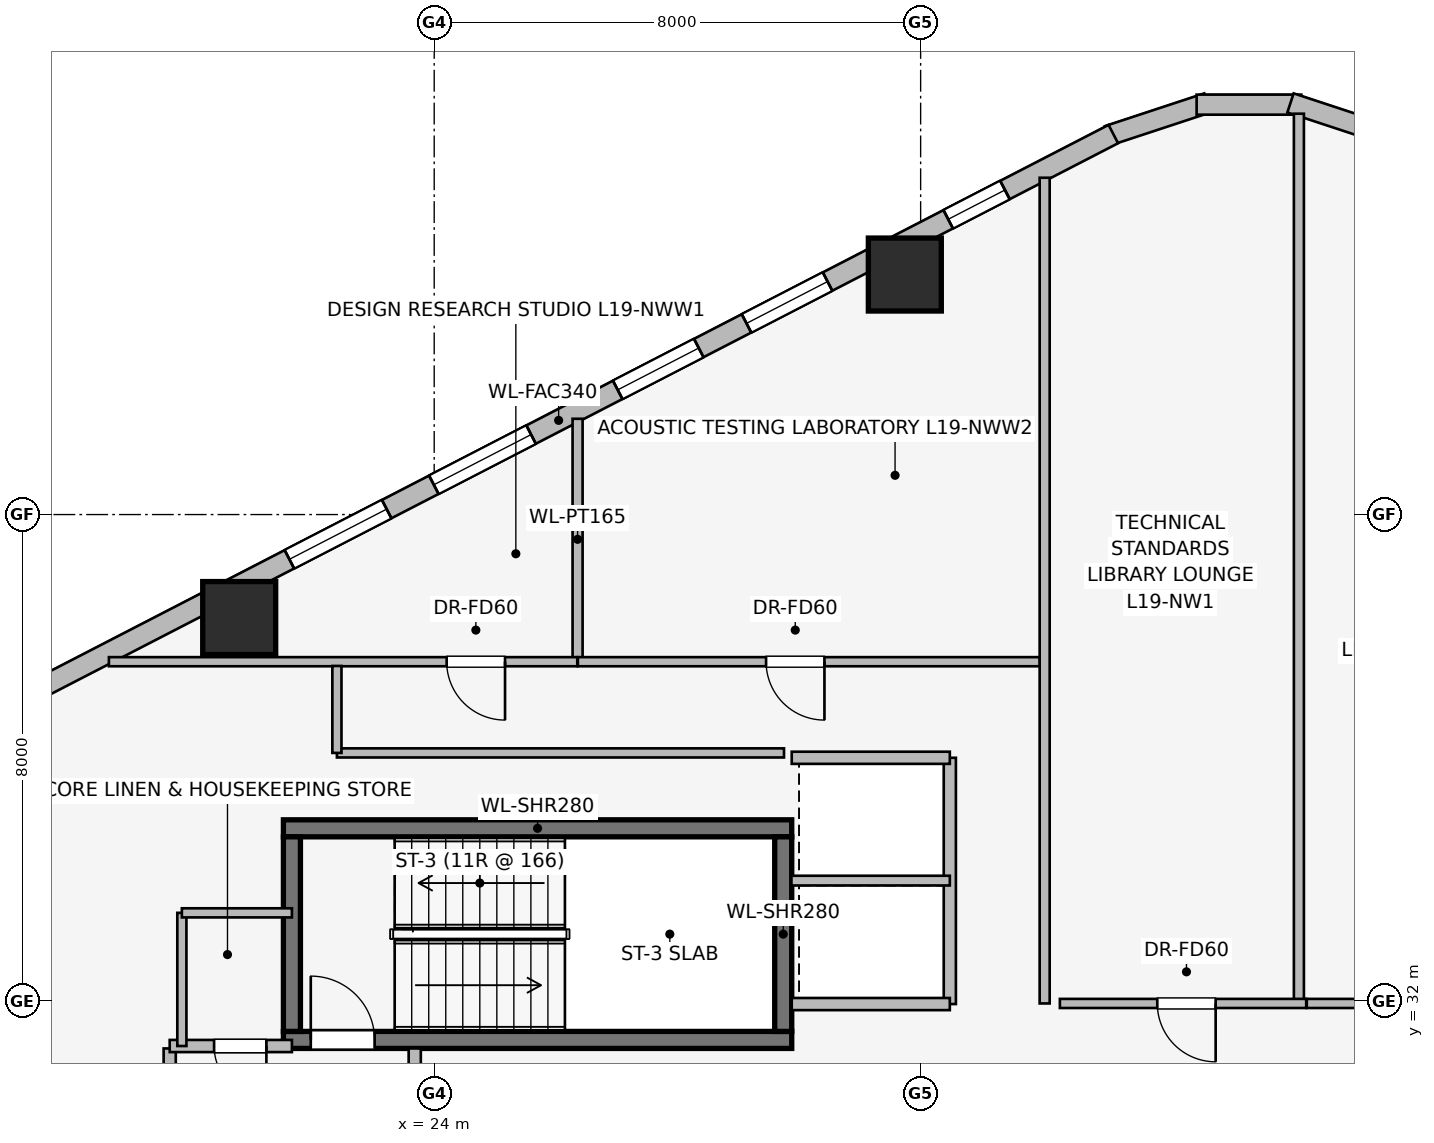
"""IFC4 building model, lengths in metres.
Left out: names, types, materials, properties, quantities, classifications, styles, units other than length and angle.
Written with IfcOpenShell. Run it as: python <this file> out.ifc"""

import sys

from ifc_helpers import new_model, si_unit, direction, frame, frame_2d, origin, origin_2d, place, context, subcontext, project, spatial, rectangle, extrude, element, fill, save


model = new_model("IFC4")
c1 = context("Model", 3, precision=1e-05, world=origin(), true_north=direction((0.0, 1.0)))
c2 = subcontext(c1, "Body", "Model", "MODEL_VIEW")
j1 = project(units=[si_unit("LENGTHUNIT", "METRE"), si_unit("PLANEANGLEUNIT", "RADIAN")], contexts=[c1])
p1 = place(None, origin())
s1 = spatial("IfcSite", under=j1, at=p1, CompositionType="ELEMENT")
p2 = place(p1, origin())
s2 = spatial("IfcBuilding", under=s1, at=p2, CompositionType="ELEMENT")
p3 = place(p2, frame((0.0, 0.0, 74.45)))
s3 = spatial("IfcBuildingStorey", under=s2, at=p3, CompositionType="ELEMENT", Elevation=74.45)
p4 = place(p3, frame((21.52, 31.36, 0.0), z_axis=(0.0, 0.0, 1.0), x_axis=(1.0, 0.0, 0.0)))
e1 = element("IfcWall", 1, at=p4, inside=s3, PredefinedType="SHEAR", context=c2, shape_type="SweptSolid", body=[
    extrude(rectangle(XDim=8.36, YDim=0.28, at=frame_2d((4.18, 0.0))), origin(), (0.0, 0.0, 1.0), 3.65),
])
p5 = place(p4, frame((0.45, 0.0, 0.0)))
e2 = element("IfcOpeningElement", 2, at=p5, cuts=e1, PredefinedType="OPENING", context=c2, shape_type="SweptSolid", body=[
    extrude(rectangle(XDim=1.05, YDim=2.0, at=frame_2d((0.525, 1.0))), frame((0.0, 0.15, 0.0), z_axis=(0.0, -1.0, 0.0), x_axis=(1.0, 0.0, 0.0)), (0.0, 0.0, 1.0), 0.3),
])
p6 = place(p3, frame((29.88, 34.84, 0.0), z_axis=(0.0, 0.0, 1.0), x_axis=(-1.0, 0.0, 0.0)))
e3 = element("IfcWall", 3, at=p6, inside=s3, PredefinedType="SHEAR", context=c2, shape_type="SweptSolid", body=[
    extrude(rectangle(XDim=8.36, YDim=0.28, at=frame_2d((4.18, 0.0))), origin(), (0.0, 0.0, 1.0), 3.65),
])
for number, where, z_axis, x_axis in (
    (4, (21.66, 34.7, 0.0), (0.0, 0.0, 1.0), (0.0, -1.0, 0.0)),
    (5, (29.74, 31.5, 0.0), (0.0, 0.0, 1.0), (0.0, 1.0, 0.0)),
):
    element("IfcWall", number, at=place(p3, frame(where, z_axis=z_axis, x_axis=x_axis)), inside=s3, PredefinedType="SHEAR", context=c2, shape_type="SweptSolid", body=[
        extrude(rectangle(XDim=3.2, YDim=0.28, at=frame_2d((1.6, 0.0))), origin(), (0.0, 0.0, 1.0), 3.65),
    ])
for number, where, z_axis, x_axis in (
    (6, (31.74, 43.947, 0.0), (0.0, 0.0, 1.0), (1.0, 0.0, 0.0)),
    (7, (20.793, 38.298, 0.0), (0.0, 0.0, 1.0), (1.0, 0.0, 0.0)),
):
    element("IfcColumn", number, at=place(p3, frame(where, z_axis=z_axis, x_axis=x_axis)), inside=s3, PredefinedType="COLUMN", context=c2, shape_type="SweptSolid", body=[
        extrude(rectangle(XDim=1.2, YDim=1.2, at=origin_2d()), origin(), (0.0, 0.0, 1.0), 3.65),
    ])
p7 = place(p3, frame((35.081, 46.231, 0.0), z_axis=(0.0, 0.0, 1.0), x_axis=(0.94976901097, 0.312951794691, 0.0)))
e8 = element("IfcWall", 8, at=p7, inside=s3, PredefinedType="STANDARD", context=c2, shape_type="SweptSolid", body=[
    extrude(rectangle(XDim=1.722, YDim=0.33, at=frame_2d((0.861, 0.0))), origin(), (0.0, 0.0, 1.0), 3.39),
])
p8 = place(p3, frame((36.539, 46.741, 0.0), z_axis=(0.0, 0.0, 1.0), x_axis=(1.0, 0.0, 0.0)))
e9 = element("IfcWall", 9, at=p8, inside=s3, PredefinedType="STANDARD", context=c2, shape_type="SweptSolid", body=[
    extrude(rectangle(XDim=1.722, YDim=0.33, at=frame_2d((0.861, 0.0))), origin(), (0.0, 0.0, 1.0), 3.39),
])
p9 = place(p3, frame((38.083, 46.77, 0.0), z_axis=(0.0, 0.0, 1.0), x_axis=(0.94976901097, -0.312951794691, 0.0)))
e10 = element("IfcWall", 10, at=p9, inside=s3, PredefinedType="STANDARD", context=c2, shape_type="SweptSolid", body=[
    extrude(rectangle(XDim=1.722, YDim=0.33, at=frame_2d((0.861, 0.0))), origin(), (0.0, 0.0, 1.0), 3.39),
])
p10 = place(p3, frame((16.924, 36.841, 0.0), z_axis=(0.0, 0.0, 1.0), x_axis=(0.888634413993, 0.458616264721, 0.0)))
e11 = element("IfcWall", 11, at=p10, inside=s3, PredefinedType="STANDARD", context=c2, shape_type="SweptSolid", body=[
    extrude(rectangle(XDim=20.531, YDim=0.34, at=frame_2d((10.266, 0.0))), origin(), (0.0, 0.0, 1.0), 2.684),
])
p11 = place(p10, frame((5.283, 0.0, 0.75)))
e12 = element("IfcOpeningElement", 12, at=p11, cuts=e11, PredefinedType="OPENING", context=c2, shape_type="SweptSolid", body=[
    extrude(rectangle(XDim=1.8, YDim=1.5, at=frame_2d((0.9, 0.75))), frame((0.0, 0.18, 0.0), z_axis=(0.0, -1.0, 0.0), x_axis=(1.0, 0.0, 0.0)), (0.0, 0.0, 1.0), 0.36),
])
p12 = place(p10, frame((7.956, 0.0, 0.75)))
e13 = element("IfcOpeningElement", 13, at=p12, cuts=e11, PredefinedType="OPENING", context=c2, shape_type="SweptSolid", body=[
    extrude(rectangle(XDim=1.8, YDim=1.5, at=frame_2d((0.9, 0.75))), frame((0.0, 0.18, 0.0), z_axis=(0.0, -1.0, 0.0), x_axis=(1.0, 0.0, 0.0)), (0.0, 0.0, 1.0), 0.36),
])
p13 = place(p10, frame((11.359, 0.0, 0.75)))
e14 = element("IfcOpeningElement", 14, at=p13, cuts=e11, PredefinedType="OPENING", context=c2, shape_type="SweptSolid", body=[
    extrude(rectangle(XDim=1.5, YDim=1.5, at=frame_2d((0.75, 0.75))), frame((0.0, 0.18, 0.0), z_axis=(0.0, -1.0, 0.0), x_axis=(1.0, 0.0, 0.0)), (0.0, 0.0, 1.0), 0.36),
])
p14 = place(p10, frame((13.743, 0.0, 0.75)))
e15 = element("IfcOpeningElement", 15, at=p14, cuts=e11, PredefinedType="OPENING", context=c2, shape_type="SweptSolid", body=[
    extrude(rectangle(XDim=1.5, YDim=1.5, at=frame_2d((0.75, 0.75))), frame((0.0, 0.18, 0.0), z_axis=(0.0, -1.0, 0.0), x_axis=(1.0, 0.0, 0.0)), (0.0, 0.0, 1.0), 0.36),
])
p15 = place(p10, frame((17.476, 0.0, 0.75)))
e16 = element("IfcOpeningElement", 16, at=p15, cuts=e11, PredefinedType="OPENING", context=c2, shape_type="SweptSolid", body=[
    extrude(rectangle(XDim=1.05, YDim=1.4, at=frame_2d((0.525, 0.7))), frame((0.0, 0.18, 0.0), z_axis=(0.0, -1.0, 0.0), x_axis=(1.0, 0.0, 0.0)), (0.0, 0.0, 1.0), 0.36),
])
p16 = place(p3, frame((19.65, 25.68, 0.0), z_axis=(0.0, 0.0, 1.0), x_axis=(0.0, 1.0, 0.0)))
e17 = element("IfcWall", 17, at=p16, inside=s3, PredefinedType="PARTITIONING", context=c2, shape_type="SweptSolid", body=[
    extrude(rectangle(XDim=5.54, YDim=0.2, at=frame_2d((2.77, 0.0))), origin(), (0.0, 0.0, 1.0), 3.39),
])
p17 = place(p16, frame((0.62, 0.0, 0.0)))
e18 = element("IfcOpeningElement", 18, at=p17, cuts=e17, PredefinedType="OPENING", context=c2, shape_type="SweptSolid", body=[
    extrude(rectangle(XDim=1.1, YDim=2.2, at=frame_2d((0.55, 1.1))), frame((0.0, 0.11, 0.0), z_axis=(0.0, -1.0, 0.0), x_axis=(1.0, 0.0, 0.0)), (0.0, 0.0, 1.0), 0.22),
])
p18 = place(p16, frame((3.12, 0.0, 0.0)))
e19 = element("IfcOpeningElement", 19, at=p18, cuts=e17, PredefinedType="OPENING", context=c2, shape_type="SweptSolid", body=[
    extrude(rectangle(XDim=1.1, YDim=2.2, at=frame_2d((0.55, 1.1))), frame((0.0, 0.11, 0.0), z_axis=(0.0, -1.0, 0.0), x_axis=(1.0, 0.0, 0.0)), (0.0, 0.0, 1.0), 0.22),
])
p19 = place(p3, frame((23.68, 25.68, 0.0), z_axis=(0.0, 0.0, 1.0), x_axis=(0.0, 1.0, 0.0)))
e20 = element("IfcWall", 20, at=p19, inside=s3, PredefinedType="PARTITIONING", context=c2, shape_type="SweptSolid", body=[
    extrude(rectangle(XDim=5.54, YDim=0.2, at=frame_2d((2.77, 0.0))), origin(), (0.0, 0.0, 1.0), 3.39),
])
p20 = place(p19, frame((1.8, 0.0, 0.0)))
e21 = element("IfcOpeningElement", 21, at=p20, cuts=e20, PredefinedType="OPENING", context=c2, shape_type="SweptSolid", body=[
    extrude(rectangle(XDim=1.05, YDim=2.0, at=frame_2d((0.525, 1.0))), frame((0.0, 0.11, 0.0), z_axis=(0.0, -1.0, 0.0), x_axis=(1.0, 0.0, 0.0)), (0.0, 0.0, 1.0), 0.22),
])
p21 = place(p3, frame((21.66, 31.26, 0.0), z_axis=(0.0, 0.0, 1.0), x_axis=(-1.0, 0.0, 0.0)))
e22 = element("IfcWall", 22, at=p21, inside=s3, PredefinedType="PARTITIONING", context=c2, shape_type="SweptSolid", body=[
    extrude(rectangle(XDim=2.01, YDim=0.2, at=frame_2d((1.005, 0.0))), origin(), (0.0, 0.0, 1.0), 3.39),
])
p22 = place(p21, frame((0.42, 0.0, 0.0)))
e23 = element("IfcOpeningElement", 23, at=p22, cuts=e22, PredefinedType="OPENING", context=c2, shape_type="SweptSolid", body=[
    extrude(rectangle(XDim=0.86, YDim=2.0, at=frame_2d((0.43, 1.0))), frame((0.0, 0.11, 0.0), z_axis=(0.0, -1.0, 0.0), x_axis=(1.0, 0.0, 0.0)), (0.0, 0.0, 1.0), 0.22),
])
p23 = place(p3, frame((32.48, 31.95, 0.0), z_axis=(0.0, 0.0, 1.0), x_axis=(0.0, 1.0, 0.0)))
e24 = element("IfcWall", 24, at=p23, inside=s3, PredefinedType="PARTITIONING", context=c2, shape_type="SweptSolid", body=[
    extrude(rectangle(XDim=4.05, YDim=0.2, at=frame_2d((2.025, 0.0))), origin(), (0.0, 0.0, 1.0), 2.513),
])
for number, where, z_axis, x_axis in (
    (25, (29.88, 36.0, 0.0), (0.0, 0.0, 1.0), (1.0, 0.0, 0.0)),
    (26, (32.48, 31.95, 0.0), (0.0, 0.0, 1.0), (-1.0, 0.0, 0.0)),
):
    element("IfcWall", number, at=place(p3, frame(where, z_axis=z_axis, x_axis=x_axis)), inside=s3, PredefinedType="PARTITIONING", context=c2, shape_type="SweptSolid", body=[
        extrude(rectangle(XDim=2.6, YDim=0.2, at=frame_2d((1.3, 0.0))), origin(), (0.0, 0.0, 1.0), 3.39),
    ])
p24 = place(p3, frame((29.875, 33.98, 0.0), z_axis=(0.0, 0.0, 1.0), x_axis=(1.0, 0.0, 0.0)))
e27 = element("IfcWall", 27, at=p24, inside=s3, PredefinedType="PARTITIONING", context=c2, shape_type="SweptSolid", body=[
    extrude(rectangle(XDim=2.605, YDim=0.16, at=frame_2d((1.302, 0.0))), origin(), (0.0, 0.0, 1.0), 3.39),
])
p25 = place(p3, frame((19.85, 33.45, 0.0), z_axis=(0.0, 0.0, 1.0), x_axis=(0.0, -1.0, 0.0)))
e28 = element("IfcWall", 28, at=p25, inside=s3, PredefinedType="PARTITIONING", context=c2, shape_type="SweptSolid", body=[
    extrude(rectangle(XDim=2.19, YDim=0.15, at=frame_2d((1.095, 0.0))), origin(), (0.0, 0.0, 1.0), 3.39),
])
p26 = place(p3, frame((21.66, 33.45, 0.0), z_axis=(0.0, 0.0, 1.0), x_axis=(-1.0, 0.0, 0.0)))
e29 = element("IfcWall", 29, at=p26, inside=s3, PredefinedType="PARTITIONING", context=c2, shape_type="SweptSolid", body=[
    extrude(rectangle(XDim=1.81, YDim=0.15, at=frame_2d((0.905, 0.0))), origin(), (0.0, 0.0, 1.0), 3.39),
])
p27 = place(p3, frame((26.358, 37.61, 0.0), z_axis=(0.0, 0.0, 1.0), x_axis=(0.0, 1.0, 0.0)))
e30 = element("IfcWall", 30, at=p27, inside=s3, PredefinedType="PARTITIONING", context=c2, shape_type="SweptSolid", body=[
    extrude(rectangle(XDim=3.965, YDim=0.165, at=frame_2d((1.982, 0.0))), origin(), (0.0, 0.0, 1.0), 3.39),
])
p28 = place(p3, frame((26.353, 37.58, 0.0), z_axis=(0.0, 0.0, 1.0), x_axis=(-1.0, 0.0, 0.0)))
e31 = element("IfcWall", 31, at=p28, inside=s3, PredefinedType="PARTITIONING", context=c2, shape_type="SweptSolid", body=[
    extrude(rectangle(XDim=7.703, YDim=0.15, at=frame_2d((3.852, 0.0))), origin(), (0.0, 0.0, 1.0), 3.39),
])
p29 = place(p28, frame((1.188, 0.0, 0.0)))
e32 = element("IfcOpeningElement", 32, at=p29, cuts=e31, PredefinedType="OPENING", context=c2, shape_type="SweptSolid", body=[
    extrude(rectangle(XDim=0.96, YDim=2.0, at=frame_2d((0.48, 1.0))), frame((0.0, 0.085, 0.0), z_axis=(0.0, -1.0, 0.0), x_axis=(1.0, 0.0, 0.0)), (0.0, 0.0, 1.0), 0.17),
])
p30 = place(p3, frame((33.962, 37.58, 0.0), z_axis=(0.0, 0.0, 1.0), x_axis=(-1.0, 0.0, 0.0)))
e33 = element("IfcWall", 33, at=p30, inside=s3, PredefinedType="PARTITIONING", context=c2, shape_type="SweptSolid", body=[
    extrude(rectangle(XDim=7.599, YDim=0.15, at=frame_2d((3.799, 0.0))), origin(), (0.0, 0.0, 1.0), 3.39),
])
p31 = place(p30, frame((3.544, 0.0, 0.0)))
e34 = element("IfcOpeningElement", 34, at=p31, cuts=e33, PredefinedType="OPENING", context=c2, shape_type="SweptSolid", body=[
    extrude(rectangle(XDim=0.96, YDim=2.0, at=frame_2d((0.48, 1.0))), frame((0.0, 0.085, 0.0), z_axis=(0.0, -1.0, 0.0), x_axis=(1.0, 0.0, 0.0)), (0.0, 0.0, 1.0), 0.17),
])
p32 = place(p3, frame((34.04, 31.96, 0.0), z_axis=(0.0, 0.0, 1.0), x_axis=(0.0, 1.0, 0.0)))
e35 = element("IfcWall", 35, at=p32, inside=s3, PredefinedType="PARTITIONING", context=c2, shape_type="SweptSolid", body=[
    extrude(rectangle(XDim=13.579, YDim=0.165, at=frame_2d((6.79, 0.0))), origin(), (0.0, 0.0, 1.0), 3.39),
])
p33 = place(p3, frame((38.221, 31.97, 0.0), z_axis=(0.0, 0.0, 1.0), x_axis=(0.0, 1.0, 0.0)))
e36 = element("IfcWall", 36, at=p33, inside=s3, PredefinedType="PARTITIONING", context=c2, shape_type="SweptSolid", body=[
    extrude(rectangle(XDim=14.622, YDim=0.165, at=frame_2d((7.311, 0.0))), origin(), (0.0, 0.0, 1.0), 3.39),
])
p34 = place(p3, frame((38.341, 31.96, 0.0), z_axis=(0.0, 0.0, 1.0), x_axis=(-1.0, 0.0, 0.0)))
e37 = element("IfcWall", 37, at=p34, inside=s3, PredefinedType="PARTITIONING", context=c2, shape_type="SweptSolid", body=[
    extrude(rectangle(XDim=4.051, YDim=0.15, at=frame_2d((2.025, 0.0))), origin(), (0.0, 0.0, 1.0), 3.39),
])
p35 = place(p34, frame((1.489, 0.0, 0.0)))
e38 = element("IfcOpeningElement", 38, at=p35, cuts=e37, PredefinedType="OPENING", context=c2, shape_type="SweptSolid", body=[
    extrude(rectangle(XDim=0.96, YDim=2.0, at=frame_2d((0.48, 1.0))), frame((0.0, 0.085, 0.0), z_axis=(0.0, -1.0, 0.0), x_axis=(1.0, 0.0, 0.0)), (0.0, 0.0, 1.0), 0.17),
])
p36 = place(p3, frame((42.347, 31.96, 0.0), z_axis=(0.0, 0.0, 1.0), x_axis=(-1.0, 0.0, 0.0)))
e39 = element("IfcWall", 39, at=p36, inside=s3, PredefinedType="PARTITIONING", context=c2, shape_type="SweptSolid", body=[
    extrude(rectangle(XDim=3.996, YDim=0.15, at=frame_2d((1.998, 0.0))), origin(), (0.0, 0.0, 1.0), 3.39),
])
p37 = place(p36, frame((1.575, 0.0, 0.0)))
e40 = element("IfcOpeningElement", 40, at=p37, cuts=e39, PredefinedType="OPENING", context=c2, shape_type="SweptSolid", body=[
    extrude(rectangle(XDim=0.96, YDim=2.0, at=frame_2d((0.48, 1.0))), frame((0.0, 0.085, 0.0), z_axis=(0.0, -1.0, 0.0), x_axis=(1.0, 0.0, 0.0)), (0.0, 0.0, 1.0), 0.17),
])
p38 = place(p3, frame((29.753, 36.08, 0.0), z_axis=(0.0, 0.0, 1.0), x_axis=(-1.0, 0.0, 0.0)))
e41 = element("IfcWall", 41, at=p38, inside=s3, PredefinedType="PARTITIONING", context=c2, shape_type="SweptSolid", body=[
    extrude(rectangle(XDim=7.353, YDim=0.15, at=frame_2d((3.677, 0.0))), origin(), (0.0, 0.0, 1.0), 3.39),
])
p39 = place(p3, frame((22.4, 36.08, 0.0), z_axis=(0.0, 0.0, 1.0), x_axis=(0.0, 1.0, 0.0)))
e42 = element("IfcWall", 42, at=p39, inside=s3, PredefinedType="PARTITIONING", context=c2, shape_type="SweptSolid", body=[
    extrude(rectangle(XDim=1.43, YDim=0.15, at=frame_2d((0.715, 0.0))), origin(), (0.0, 0.0, 1.0), 3.39),
])
p40 = place(p11, origin())
e43 = element("IfcWindow", 43, at=p40, inside=s3, PartitioningType="SINGLE_PANEL", PredefinedType="WINDOW", context=c2, shape_type="SweptSolid", body=[
    extrude(rectangle(XDim=1.8, YDim=1.5, at=frame_2d((0.9, 0.75))), frame((0.0, 0.03, 0.0), z_axis=(0.0, -1.0, 0.0), x_axis=(1.0, 0.0, 0.0)), (0.0, 0.0, 1.0), 0.06),
])
fill(e12, e43)
p41 = place(p12, origin())
e44 = element("IfcWindow", 44, at=p41, inside=s3, PartitioningType="SINGLE_PANEL", PredefinedType="WINDOW", context=c2, shape_type="SweptSolid", body=[
    extrude(rectangle(XDim=1.8, YDim=1.5, at=frame_2d((0.9, 0.75))), frame((0.0, 0.03, 0.0), z_axis=(0.0, -1.0, 0.0), x_axis=(1.0, 0.0, 0.0)), (0.0, 0.0, 1.0), 0.06),
])
fill(e13, e44)
p42 = place(p13, origin())
e45 = element("IfcWindow", 45, at=p42, inside=s3, PartitioningType="SINGLE_PANEL", PredefinedType="WINDOW", context=c2, shape_type="SweptSolid", body=[
    extrude(rectangle(XDim=1.5, YDim=1.5, at=frame_2d((0.75, 0.75))), frame((0.0, 0.03, 0.0), z_axis=(0.0, -1.0, 0.0), x_axis=(1.0, 0.0, 0.0)), (0.0, 0.0, 1.0), 0.06),
])
fill(e14, e45)
p43 = place(p14, origin())
e46 = element("IfcWindow", 46, at=p43, inside=s3, PartitioningType="SINGLE_PANEL", PredefinedType="WINDOW", context=c2, shape_type="SweptSolid", body=[
    extrude(rectangle(XDim=1.5, YDim=1.5, at=frame_2d((0.75, 0.75))), frame((0.0, 0.03, 0.0), z_axis=(0.0, -1.0, 0.0), x_axis=(1.0, 0.0, 0.0)), (0.0, 0.0, 1.0), 0.06),
])
fill(e15, e46)
p44 = place(p15, origin())
e47 = element("IfcWindow", 47, at=p44, inside=s3, PartitioningType="SINGLE_PANEL", PredefinedType="WINDOW", context=c2, shape_type="SweptSolid", body=[
    extrude(rectangle(XDim=1.05, YDim=1.4, at=frame_2d((0.525, 0.7))), frame((0.0, 0.03, 0.0), z_axis=(0.0, -1.0, 0.0), x_axis=(1.0, 0.0, 0.0)), (0.0, 0.0, 1.0), 0.06),
])
fill(e16, e47)
p45 = place(p5, origin())
e48 = element("IfcDoor", 48, at=p45, inside=s3, OperationType="SINGLE_SWING_LEFT", PredefinedType="DOOR", context=c2, shape_type="SweptSolid", body=[
    extrude(rectangle(XDim=1.05, YDim=2.0, at=frame_2d((0.525, 1.0))), frame((0.0, 0.025, 0.0), z_axis=(0.0, -1.0, 0.0), x_axis=(1.0, 0.0, 0.0)), (0.0, 0.0, 1.0), 0.05),
])
fill(e2, e48)
p46 = place(p22, origin())
e49 = element("IfcDoor", 49, at=p46, inside=s3, OperationType="SINGLE_SWING_LEFT", PredefinedType="DOOR", context=c2, shape_type="SweptSolid", body=[
    extrude(rectangle(XDim=0.86, YDim=2.0, at=frame_2d((0.43, 1.0))), frame((0.0, 0.025, 0.0), z_axis=(0.0, -1.0, 0.0), x_axis=(1.0, 0.0, 0.0)), (0.0, 0.0, 1.0), 0.05),
])
fill(e23, e49)
p47 = place(p29, origin())
e50 = element("IfcDoor", 50, at=p47, inside=s3, OperationType="SINGLE_SWING_LEFT", PredefinedType="DOOR", context=c2, shape_type="SweptSolid", body=[
    extrude(rectangle(XDim=0.96, YDim=2.0, at=frame_2d((0.48, 1.0))), frame((0.0, 0.025, 0.0), z_axis=(0.0, -1.0, 0.0), x_axis=(1.0, 0.0, 0.0)), (0.0, 0.0, 1.0), 0.05),
])
fill(e32, e50)
p48 = place(p31, origin())
e51 = element("IfcDoor", 51, at=p48, inside=s3, OperationType="SINGLE_SWING_LEFT", PredefinedType="DOOR", context=c2, shape_type="SweptSolid", body=[
    extrude(rectangle(XDim=0.96, YDim=2.0, at=frame_2d((0.48, 1.0))), frame((0.0, 0.025, 0.0), z_axis=(0.0, -1.0, 0.0), x_axis=(1.0, 0.0, 0.0)), (0.0, 0.0, 1.0), 0.05),
])
fill(e34, e51)
p49 = place(p35, origin())
e52 = element("IfcDoor", 52, at=p49, inside=s3, OperationType="SINGLE_SWING_LEFT", PredefinedType="DOOR", context=c2, shape_type="SweptSolid", body=[
    extrude(rectangle(XDim=0.96, YDim=2.0, at=frame_2d((0.48, 1.0))), frame((0.0, 0.025, 0.0), z_axis=(0.0, -1.0, 0.0), x_axis=(1.0, 0.0, 0.0)), (0.0, 0.0, 1.0), 0.05),
])
fill(e38, e52)
save(model, sys.argv[1])
